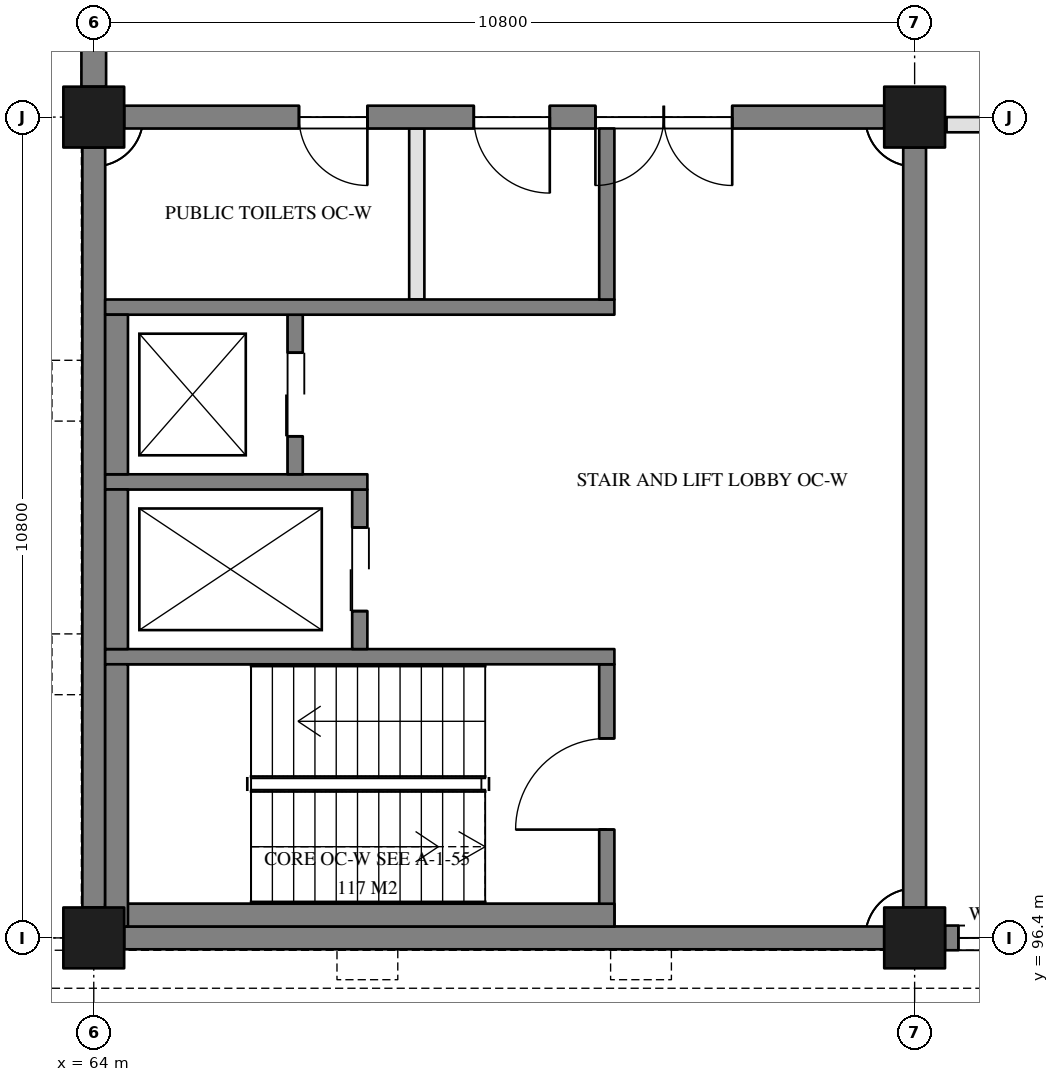
"""IFC4 building model, lengths in metres.
Left out: names, types, materials, properties, quantities, classifications, styles, units other than length and angle.
Written with IfcOpenShell. Run it as: python <this file> out.ifc"""

import sys

from ifc_helpers import new_model, si_unit, direction, frame, frame_2d, origin, origin_2d, place, context, subcontext, project, spatial, rectangle, extrude, element, fill, save


model = new_model("IFC4")
c1 = context("Model", 3, precision=1e-05, world=origin(), true_north=direction((0.0, 1.0)))
c2 = subcontext(c1, "Body", "Model", "MODEL_VIEW")
j1 = project(units=[si_unit("LENGTHUNIT", "METRE"), si_unit("PLANEANGLEUNIT", "RADIAN")], contexts=[c1])
p1 = place(None, origin())
s1 = spatial("IfcSite", under=j1, at=p1, CompositionType="ELEMENT")
p2 = place(p1, origin())
s2 = spatial("IfcBuilding", under=s1, at=p2, CompositionType="ELEMENT")
p3 = place(p2, frame((0.0, 0.0, 8.7)))
s3 = spatial("IfcBuildingStorey", under=s2, at=p3, CompositionType="ELEMENT", Elevation=8.7)
for number, where, z_axis, x_axis in (
    (1, (64.0, 96.4, 0.0), (0.0, 0.0, 1.0), (1.0, 0.0, 0.0)),
    (2, (64.0, 107.2, 0.0), (0.0, 0.0, 1.0), (1.0, 0.0, 0.0)),
    (3, (74.8, 96.4, 0.0), (0.0, 0.0, 1.0), (1.0, 0.0, 0.0)),
    (4, (74.8, 107.2, 0.0), (0.0, 0.0, 1.0), (1.0, 0.0, 0.0)),
):
    element("IfcColumn", number, at=place(p3, frame(where, z_axis=z_axis, x_axis=x_axis)), inside=s3, PredefinedType="COLUMN", context=c2, shape_type="SweptSolid", body=[
        extrude(rectangle(XDim=0.8, YDim=0.8, at=origin_2d()), origin(), (0.0, 0.0, 1.0), 3.9),
    ])
for number, where, z_axis, x_axis in (
    (5, (64.4, 96.4, 0.0), (0.0, 0.0, 1.0), (1.0, 0.0, 0.0)),
    (6, (74.8, 96.8, 0.0), (0.0, 0.0, 1.0), (0.0, 1.0, 0.0)),
):
    element("IfcWall", number, at=place(p3, frame(where, z_axis=z_axis, x_axis=x_axis)), inside=s3, PredefinedType="SOLIDWALL", context=c2, shape_type="SweptSolid", body=[
        extrude(rectangle(XDim=10.0, YDim=0.3, at=frame_2d((5.0, 0.0))), origin(), (0.0, 0.0, 1.0), 3.9),
    ])
p4 = place(p3, frame((74.4, 107.2, 0.0), z_axis=(0.0, 0.0, 1.0), x_axis=(-1.0, 0.0, 0.0)))
e7 = element("IfcWall", 7, at=p4, inside=s3, PredefinedType="SOLIDWALL", context=c2, shape_type="SweptSolid", body=[
    extrude(rectangle(XDim=10.0, YDim=0.3, at=frame_2d((5.0, 0.0))), origin(), (0.0, 0.0, 1.0), 3.9),
])
p5 = place(p4, frame((2.0, 0.0, 0.0)))
e8 = element("IfcOpeningElement", 8, at=p5, cuts=e7, PredefinedType="OPENING", context=c2, shape_type="SweptSolid", body=[
    extrude(rectangle(XDim=1.8, YDim=2.1, at=frame_2d((0.9, 1.05))), frame((0.0, 0.16, 0.0), z_axis=(0.0, -1.0, 0.0), x_axis=(1.0, 0.0, 0.0)), (0.0, 0.0, 1.0), 0.32),
])
p6 = place(p4, frame((4.4, 0.0, 0.0)))
e9 = element("IfcOpeningElement", 9, at=p6, cuts=e7, PredefinedType="OPENING", context=c2, shape_type="SweptSolid", body=[
    extrude(rectangle(XDim=1.0, YDim=2.1, at=frame_2d((0.5, 1.05))), frame((0.0, 0.16, 0.0), z_axis=(0.0, -1.0, 0.0), x_axis=(1.0, 0.0, 0.0)), (0.0, 0.0, 1.0), 0.32),
])
p7 = place(p4, frame((6.8, 0.0, 0.0)))
e10 = element("IfcOpeningElement", 10, at=p7, cuts=e7, PredefinedType="OPENING", context=c2, shape_type="SweptSolid", body=[
    extrude(rectangle(XDim=0.9, YDim=2.1, at=frame_2d((0.45, 1.05))), frame((0.0, 0.16, 0.0), z_axis=(0.0, -1.0, 0.0), x_axis=(1.0, 0.0, 0.0)), (0.0, 0.0, 1.0), 0.32),
])
p8 = place(p3, frame((64.0, 106.8, 0.0), z_axis=(0.0, 0.0, 1.0), x_axis=(0.0, -1.0, 0.0)))
e11 = element("IfcWall", 11, at=p8, inside=s3, PredefinedType="SOLIDWALL", context=c2, shape_type="SweptSolid", body=[
    extrude(rectangle(XDim=10.0, YDim=0.3, at=frame_2d((5.0, 0.0))), origin(), (0.0, 0.0, 1.0), 3.9),
])
p9 = place(p3, frame((75.2, 96.4, 0.0), z_axis=(0.0, 0.0, 1.0), x_axis=(1.0, 0.0, 0.0)))
e12 = element("IfcWall", 12, at=p9, inside=s3, PredefinedType="SOLIDWALL", context=c2, shape_type="SweptSolid", body=[
    extrude(rectangle(XDim=10.0, YDim=0.325, at=frame_2d((5.0, 0.0))), origin(), (0.0, 0.0, 1.0), 2.8),
])
p10 = place(p9, frame((0.175, 0.0, 0.5)))
e13 = element("IfcOpeningElement", 13, at=p10, cuts=e12, PredefinedType="OPENING", context=c2, shape_type="SweptSolid", body=[
    extrude(rectangle(XDim=0.95, YDim=2.25, at=frame_2d((0.475, 1.125))), frame((0.0, 0.172, 0.0), z_axis=(0.0, -1.0, 0.0), x_axis=(1.0, 0.0, 0.0)), (0.0, 0.0, 1.0), 0.345),
])
p11 = place(p9, frame((3.775, 0.0, 0.5)))
e14 = element("IfcOpeningElement", 14, at=p11, cuts=e12, PredefinedType="OPENING", context=c2, shape_type="SweptSolid", body=[
    extrude(rectangle(XDim=0.95, YDim=2.25, at=frame_2d((0.475, 1.125))), frame((0.0, 0.172, 0.0), z_axis=(0.0, -1.0, 0.0), x_axis=(1.0, 0.0, 0.0)), (0.0, 0.0, 1.0), 0.345),
])
p12 = place(p9, frame((7.375, 0.0, 0.5)))
e15 = element("IfcOpeningElement", 15, at=p12, cuts=e12, PredefinedType="OPENING", context=c2, shape_type="SweptSolid", body=[
    extrude(rectangle(XDim=0.95, YDim=2.25, at=frame_2d((0.475, 1.125))), frame((0.0, 0.172, 0.0), z_axis=(0.0, -1.0, 0.0), x_axis=(1.0, 0.0, 0.0)), (0.0, 0.0, 1.0), 0.345),
])
p13 = place(p9, frame((1.675, 0.0, 0.5)))
e16 = element("IfcOpeningElement", 16, at=p13, cuts=e12, PredefinedType="OPENING", context=c2, shape_type="SweptSolid", body=[
    extrude(rectangle(XDim=0.95, YDim=2.25, at=frame_2d((0.475, 1.125))), frame((0.0, 0.172, 0.0), z_axis=(0.0, -1.0, 0.0), x_axis=(1.0, 0.0, 0.0)), (0.0, 0.0, 1.0), 0.345),
])
p14 = place(p9, frame((5.275, 0.0, 0.5)))
e17 = element("IfcOpeningElement", 17, at=p14, cuts=e12, PredefinedType="OPENING", context=c2, shape_type="SweptSolid", body=[
    extrude(rectangle(XDim=0.95, YDim=2.25, at=frame_2d((0.475, 1.125))), frame((0.0, 0.172, 0.0), z_axis=(0.0, -1.0, 0.0), x_axis=(1.0, 0.0, 0.0)), (0.0, 0.0, 1.0), 0.345),
])
p15 = place(p9, frame((8.875, 0.0, 0.5)))
e18 = element("IfcOpeningElement", 18, at=p15, cuts=e12, PredefinedType="OPENING", context=c2, shape_type="SweptSolid", body=[
    extrude(rectangle(XDim=0.95, YDim=2.25, at=frame_2d((0.475, 1.125))), frame((0.0, 0.172, 0.0), z_axis=(0.0, -1.0, 0.0), x_axis=(1.0, 0.0, 0.0)), (0.0, 0.0, 1.0), 0.345),
])
p16 = place(p3, frame((64.0, 107.6, 0.0), z_axis=(0.0, 0.0, 1.0), x_axis=(0.0, 1.0, 0.0)))
e19 = element("IfcWall", 19, at=p16, inside=s3, PredefinedType="SOLIDWALL", context=c2, shape_type="SweptSolid", body=[
    extrude(rectangle(XDim=3.8, YDim=0.325, at=frame_2d((1.9, 0.0))), origin(), (0.0, 0.0, 1.0), 2.8),
])
p17 = place(p16, frame((0.95, 0.0, 0.7)))
e20 = element("IfcOpeningElement", 20, at=p17, cuts=e19, PredefinedType="OPENING", context=c2, shape_type="SweptSolid", body=[
    extrude(rectangle(XDim=0.9, YDim=2.0, at=frame_2d((0.45, 1.0))), frame((0.0, 0.172, 0.0), z_axis=(0.0, -1.0, 0.0), x_axis=(1.0, 0.0, 0.0)), (0.0, 0.0, 1.0), 0.345),
])
p18 = place(p3, frame((70.75, 96.55, 0.0), z_axis=(0.0, 0.0, 1.0), x_axis=(0.0, 1.0, 0.0)))
e21 = element("IfcWall", 21, at=p18, inside=s3, PredefinedType="SOLIDWALL", context=c2, shape_type="SweptSolid", body=[
    extrude(rectangle(XDim=3.45, YDim=0.2, at=frame_2d((1.725, 0.0))), origin(), (0.0, 0.0, 1.0), 3.6),
])
p19 = place(p18, frame((1.275, 0.0, 0.0)))
e22 = element("IfcOpeningElement", 22, at=p19, cuts=e21, PredefinedType="OPENING", context=c2, shape_type="SweptSolid", body=[
    extrude(rectangle(XDim=1.2, YDim=2.1, at=frame_2d((0.6, 1.05))), frame((0.0, 0.11, 0.0), z_axis=(0.0, -1.0, 0.0), x_axis=(1.0, 0.0, 0.0)), (0.0, 0.0, 1.0), 0.22),
])
p20 = place(p3, frame((70.85, 100.1, 0.0), z_axis=(0.0, 0.0, 1.0), x_axis=(-1.0, 0.0, 0.0)))
e23 = element("IfcWall", 23, at=p20, inside=s3, PredefinedType="SOLIDWALL", context=c2, shape_type="SweptSolid", body=[
    extrude(rectangle(XDim=6.7, YDim=0.2, at=frame_2d((3.35, 0.0))), origin(), (0.0, 0.0, 1.0), 3.6),
])
p21 = place(p3, frame((67.5, 100.2, 0.0), z_axis=(0.0, 0.0, 1.0), x_axis=(0.0, 1.0, 0.0)))
e24 = element("IfcWall", 24, at=p21, inside=s3, PredefinedType="SOLIDWALL", context=c2, shape_type="SweptSolid", body=[
    extrude(rectangle(XDim=2.1, YDim=0.2, at=frame_2d((1.05, 0.0))), origin(), (0.0, 0.0, 1.0), 3.6),
])
p22 = place(p21, frame((0.5, 0.0, 0.0)))
e25 = element("IfcOpeningElement", 25, at=p22, cuts=e24, PredefinedType="OPENING", context=c2, shape_type="SweptSolid", body=[
    extrude(rectangle(XDim=1.1, YDim=2.1, at=frame_2d((0.55, 1.05))), frame((0.0, 0.11, 0.0), z_axis=(0.0, -1.0, 0.0), x_axis=(1.0, 0.0, 0.0)), (0.0, 0.0, 1.0), 0.22),
])
p23 = place(p3, frame((67.6, 102.4, 0.0), z_axis=(0.0, 0.0, 1.0), x_axis=(-1.0, 0.0, 0.0)))
e26 = element("IfcWall", 26, at=p23, inside=s3, PredefinedType="SOLIDWALL", context=c2, shape_type="SweptSolid", body=[
    extrude(rectangle(XDim=3.45, YDim=0.2, at=frame_2d((1.725, 0.0))), origin(), (0.0, 0.0, 1.0), 3.6),
])
p24 = place(p3, frame((66.65, 102.5, 0.0), z_axis=(0.0, 0.0, 1.0), x_axis=(0.0, 1.0, 0.0)))
e27 = element("IfcWall", 27, at=p24, inside=s3, PredefinedType="SOLIDWALL", context=c2, shape_type="SweptSolid", body=[
    extrude(rectangle(XDim=2.1, YDim=0.2, at=frame_2d((1.05, 0.0))), origin(), (0.0, 0.0, 1.0), 3.6),
])
p25 = place(p24, frame((0.5, 0.0, 0.0)))
e28 = element("IfcOpeningElement", 28, at=p25, cuts=e27, PredefinedType="OPENING", context=c2, shape_type="SweptSolid", body=[
    extrude(rectangle(XDim=1.1, YDim=2.1, at=frame_2d((0.55, 1.05))), frame((0.0, 0.11, 0.0), z_axis=(0.0, -1.0, 0.0), x_axis=(1.0, 0.0, 0.0)), (0.0, 0.0, 1.0), 0.22),
])
p26 = place(p3, frame((70.85, 104.7, 0.0), z_axis=(0.0, 0.0, 1.0), x_axis=(-1.0, 0.0, 0.0)))
e29 = element("IfcWall", 29, at=p26, inside=s3, PredefinedType="SOLIDWALL", context=c2, shape_type="SweptSolid", body=[
    extrude(rectangle(XDim=6.7, YDim=0.2, at=frame_2d((3.35, 0.0))), origin(), (0.0, 0.0, 1.0), 3.6),
])
p27 = place(p3, frame((70.75, 104.8, 0.0), z_axis=(0.0, 0.0, 1.0), x_axis=(0.0, 1.0, 0.0)))
e30 = element("IfcWall", 30, at=p27, inside=s3, PredefinedType="SOLIDWALL", context=c2, shape_type="SweptSolid", body=[
    extrude(rectangle(XDim=2.25, YDim=0.2, at=frame_2d((1.125, 0.0))), origin(), (0.0, 0.0, 1.0), 3.6),
])
p28 = place(p3, frame((70.85, 96.7, -0.3), z_axis=(0.0, 0.0, 1.0), x_axis=(-1.0, 0.0, 0.0)))
e31 = element("IfcWall", 31, at=p28, inside=s3, PredefinedType="SOLIDWALL", context=c2, shape_type="SweptSolid", body=[
    extrude(rectangle(XDim=6.7, YDim=0.3, at=frame_2d((3.35, 0.0))), origin(), (0.0, 0.0, 1.0), 3.9),
])
p29 = place(p3, frame((64.3, 96.55, -0.3), z_axis=(0.0, 0.0, 1.0), x_axis=(0.0, 1.0, 0.0)))
e32 = element("IfcWall", 32, at=p29, inside=s3, PredefinedType="SOLIDWALL", context=c2, shape_type="SweptSolid", body=[
    extrude(rectangle(XDim=3.45, YDim=0.3, at=frame_2d((1.725, 0.0))), origin(), (0.0, 0.0, 1.0), 3.9),
])
for number, where, z_axis, x_axis in (
    (33, (64.3, 100.2, -0.3), (0.0, 0.0, 1.0), (0.0, 1.0, 0.0)),
    (34, (64.3, 102.5, -0.3), (0.0, 0.0, 1.0), (0.0, 1.0, 0.0)),
):
    element("IfcWall", number, at=place(p3, frame(where, z_axis=z_axis, x_axis=x_axis)), inside=s3, PredefinedType="SOLIDWALL", context=c2, shape_type="SweptSolid", body=[
        extrude(rectangle(XDim=2.1, YDim=0.3, at=frame_2d((1.05, 0.0))), origin(), (0.0, 0.0, 1.0), 3.9),
    ])
p30 = place(p3, frame((68.25, 104.8, 0.0), z_axis=(0.0, 0.0, 1.0), x_axis=(0.0, 1.0, 0.0)))
e35 = element("IfcWall", 35, at=p30, inside=s3, PredefinedType="PARTITIONING", context=c2, shape_type="SweptSolid", body=[
    extrude(rectangle(XDim=2.25, YDim=0.2, at=frame_2d((1.125, 0.0))), origin(), (0.0, 0.0, 1.0), 3.6),
])
p31 = place(p3, frame((75.22, 107.1, 0.0), z_axis=(0.0, 0.0, 1.0), x_axis=(1.0, 0.0, 0.0)))
e36 = element("IfcWall", 36, at=p31, inside=s3, PredefinedType="PARTITIONING", context=c2, shape_type="SweptSolid", body=[
    extrude(rectangle(XDim=9.96, YDim=0.2, at=frame_2d((4.98, 0.0))), origin(), (0.0, 0.0, 1.0), 2.8),
])
p32 = place(p31, frame((4.08, 0.0, 0.0)))
e37 = element("IfcOpeningElement", 37, at=p32, cuts=e36, PredefinedType="OPENING", context=c2, shape_type="SweptSolid", body=[
    extrude(rectangle(XDim=1.8, YDim=2.1, at=frame_2d((0.9, 1.05))), frame((0.0, 0.11, 0.0), z_axis=(0.0, -1.0, 0.0), x_axis=(1.0, 0.0, 0.0)), (0.0, 0.0, 1.0), 0.22),
])
p33 = place(p10, origin())
e38 = element("IfcWindow", 38, at=p33, inside=s3, PartitioningType="SINGLE_PANEL", PredefinedType="WINDOW", context=c2, shape_type="SweptSolid", body=[
    extrude(rectangle(XDim=0.95, YDim=2.25, at=frame_2d((0.475, 1.125))), frame((0.0, 0.03, 0.0), z_axis=(0.0, -1.0, 0.0), x_axis=(1.0, 0.0, 0.0)), (0.0, 0.0, 1.0), 0.06),
])
fill(e13, e38)
p34 = place(p22, frame((1.1, 0.0, 0.0), z_axis=(0.0, 0.0, 1.0), x_axis=(-1.0, 0.0, 0.0)))
e39 = element("IfcDoor", 39, at=p34, inside=s3, OperationType="DOUBLE_DOOR_SLIDING", PredefinedType="DOOR", context=c2, shape_type="SweptSolid", body=[
    extrude(rectangle(XDim=1.1, YDim=2.1, at=frame_2d((0.55, 1.05))), frame((0.0, 0.025, 0.0), z_axis=(0.0, -1.0, 0.0), x_axis=(1.0, 0.0, 0.0)), (0.0, 0.0, 1.0), 0.05),
])
fill(e25, e39)
p35 = place(p25, frame((1.1, 0.0, 0.0), z_axis=(0.0, 0.0, 1.0), x_axis=(-1.0, 0.0, 0.0)))
e40 = element("IfcDoor", 40, at=p35, inside=s3, OperationType="DOUBLE_DOOR_SLIDING", PredefinedType="DOOR", context=c2, shape_type="SweptSolid", body=[
    extrude(rectangle(XDim=1.1, YDim=2.1, at=frame_2d((0.55, 1.05))), frame((0.0, 0.025, 0.0), z_axis=(0.0, -1.0, 0.0), x_axis=(1.0, 0.0, 0.0)), (0.0, 0.0, 1.0), 0.05),
])
fill(e28, e40)
p36 = place(p19, frame((1.2, 0.0, 0.0), z_axis=(0.0, 0.0, 1.0), x_axis=(-1.0, 0.0, 0.0)))
e41 = element("IfcDoor", 41, at=p36, inside=s3, OperationType="SINGLE_SWING_LEFT", PredefinedType="DOOR", context=c2, shape_type="SweptSolid", body=[
    extrude(rectangle(XDim=1.2, YDim=2.1, at=frame_2d((0.6, 1.05))), frame((0.0, 0.025, 0.0), z_axis=(0.0, -1.0, 0.0), x_axis=(1.0, 0.0, 0.0)), (0.0, 0.0, 1.0), 0.05),
])
fill(e22, e41)
p37 = place(p5, frame((1.8, 0.0, 0.0), z_axis=(0.0, 0.0, 1.0), x_axis=(-1.0, 0.0, 0.0)))
e42 = element("IfcDoor", 42, at=p37, inside=s3, OperationType="DOUBLE_DOOR_DOUBLE_SWING", PredefinedType="DOOR", context=c2, shape_type="SweptSolid", body=[
    extrude(rectangle(XDim=1.8, YDim=2.1, at=frame_2d((0.9, 1.05))), frame((0.0, 0.025, 0.0), z_axis=(0.0, -1.0, 0.0), x_axis=(1.0, 0.0, 0.0)), (0.0, 0.0, 1.0), 0.05),
])
fill(e8, e42)
p38 = place(p6, origin())
e43 = element("IfcDoor", 43, at=p38, inside=s3, OperationType="SINGLE_SWING_LEFT", PredefinedType="DOOR", context=c2, shape_type="SweptSolid", body=[
    extrude(rectangle(XDim=1.0, YDim=2.1, at=frame_2d((0.5, 1.05))), frame((0.0, 0.025, 0.0), z_axis=(0.0, -1.0, 0.0), x_axis=(1.0, 0.0, 0.0)), (0.0, 0.0, 1.0), 0.05),
])
fill(e9, e43)
p39 = place(p7, origin())
e44 = element("IfcDoor", 44, at=p39, inside=s3, OperationType="SINGLE_SWING_RIGHT", PredefinedType="DOOR", context=c2, shape_type="SweptSolid", body=[
    extrude(rectangle(XDim=0.9, YDim=2.1, at=frame_2d((0.45, 1.05))), frame((0.0, 0.025, 0.0), z_axis=(0.0, -1.0, 0.0), x_axis=(1.0, 0.0, 0.0)), (0.0, 0.0, 1.0), 0.05),
])
fill(e10, e44)
save(model, sys.argv[1])
